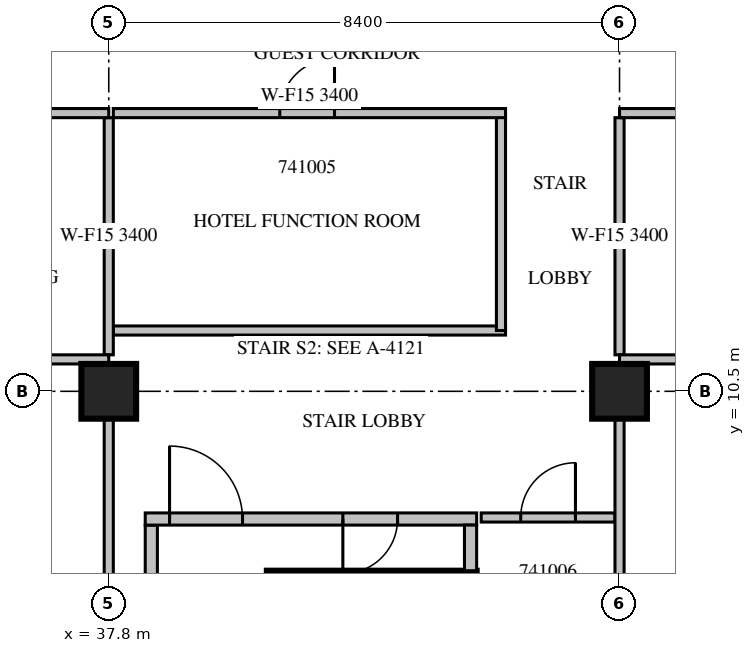
"""IFC4 building model, lengths in metres.
Left out: names, types, materials, properties, quantities, classifications, styles, units other than length and angle.
Written with IfcOpenShell. Run it as: python <this file> out.ifc"""

import sys

from ifc_helpers import new_model, si_unit, direction, frame, frame_2d, origin, origin_2d, place, context, subcontext, project, spatial, rectangle, extrude, source, transform, mapped, element, fill, save


model = new_model("IFC4")
c1 = context("Model", 3, precision=1e-05, world=origin(), true_north=direction((0.0, 1.0)))
c2 = subcontext(c1, "Body", "Model", "MODEL_VIEW")
j1 = project(units=[si_unit("LENGTHUNIT", "METRE"), si_unit("PLANEANGLEUNIT", "RADIAN")], contexts=[c1])
p1 = place(None, origin())
s1 = spatial("IfcSite", under=j1, at=p1, CompositionType="ELEMENT")
p2 = place(p1, origin())
s2 = spatial("IfcBuilding", under=s1, at=p2, CompositionType="ELEMENT")
p3 = place(p2, frame((0.0, 0.0, 189.2)))
s3 = spatial("IfcBuildingStorey", under=s2, at=p3, CompositionType="ELEMENT", Elevation=189.2)
m1 = source(origin(), c2, "Body", "SweptSolid", [
    extrude(rectangle(XDim=0.9, YDim=0.9, at=origin_2d()), origin(), (0.0, 0.0, 1.0), 3.8),
])
for number, where, z_axis, x_axis in (
    (1, (37.8, 10.5, 0.0), (0.0, 0.0, 1.0), (1.0, 0.0, 0.0)),
    (2, (46.2, 10.5, 0.0), (0.0, 0.0, 1.0), (1.0, 0.0, 0.0)),
):
    element("IfcColumn", number, at=place(p3, frame(where, z_axis=z_axis, x_axis=x_axis)), inside=s3, PredefinedType="COLUMN", context=c2, shape_type="MappedRepresentation", body=[
        mapped(m1, transform((0.0, 0.0, 0.0), scale=1.0)),
    ])
m2 = source(origin(), c2, "Body", "SweptSolid", [
    extrude(rectangle(XDim=3.45, YDim=0.25, at=frame_2d((1.725, 0.0))), origin(), (0.0, 0.0, 1.0), 3.4),
])
p4 = place(p3, frame((40.4, 7.425, 0.0), z_axis=(0.0, 0.0, 1.0), x_axis=(1.0, 0.0, 0.0)))
e3 = element("IfcWall", 3, at=p4, inside=s3, PredefinedType="SOLIDWALL", context=c2, shape_type="MappedRepresentation", body=[
    mapped(m2, transform((0.0, 0.0, 0.0), scale=1.0)),
])
m3 = source(origin(), c2, "Body", "SweptSolid", [
    extrude(rectangle(XDim=8.0, YDim=0.2, at=frame_2d((4.0, 0.0))), origin(), (0.0, 0.0, 1.0), 3.4),
])
p5 = place(p3, frame((38.5, 0.3, 0.0), z_axis=(0.0, 0.0, 1.0), x_axis=(0.0, 1.0, 0.0)))
e4 = element("IfcWall", 4, at=p5, inside=s3, PredefinedType="PARTITIONING", context=c2, shape_type="MappedRepresentation", body=[
    mapped(m3, transform((0.0, 0.0, 0.0), scale=1.0)),
])
m4 = source(origin(), c2, "Body", "SweptSolid", [
    extrude(rectangle(XDim=5.45, YDim=0.2, at=frame_2d((2.725, 0.0))), origin(), (0.0, 0.0, 1.0), 3.4),
])
p6 = place(p3, frame((38.4, 8.4, 0.0), z_axis=(0.0, 0.0, 1.0), x_axis=(1.0, 0.0, 0.0)))
e5 = element("IfcWall", 5, at=p6, inside=s3, PredefinedType="PARTITIONING", context=c2, shape_type="MappedRepresentation", body=[
    mapped(m4, transform((0.0, 0.0, 0.0), scale=1.0)),
])
m5 = source(origin(), c2, "Body", "SweptSolid", [
    extrude(rectangle(XDim=1.2, YDim=2.1, at=frame_2d((0.6, 1.05))), frame((0.0, 0.11, 0.0), z_axis=(0.0, -1.0, 0.0), x_axis=(1.0, 0.0, 0.0)), (0.0, 0.0, 1.0), 0.22),
])
p7 = place(p6, frame((0.4, 0.0, 0.0)))
e6 = element("IfcOpeningElement", 6, at=p7, cuts=e5, PredefinedType="OPENING", context=c2, shape_type="MappedRepresentation", body=[
    mapped(m5, transform((0.0, 0.0, 0.0), scale=1.0)),
])
m6 = source(origin(), c2, "Body", "SweptSolid", [
    extrude(rectangle(XDim=0.9, YDim=2.1, at=frame_2d((0.45, 1.05))), frame((0.0, 0.11, 0.0), z_axis=(0.0, -1.0, 0.0), x_axis=(1.0, 0.0, 0.0)), (0.0, 0.0, 1.0), 0.22),
])
p8 = place(p6, frame((3.25, 0.0, 0.0)))
e7 = element("IfcOpeningElement", 7, at=p8, cuts=e5, PredefinedType="OPENING", context=c2, shape_type="MappedRepresentation", body=[
    mapped(m6, transform((0.0, 0.0, 0.0), scale=1.0)),
])
m7 = source(origin(), c2, "Body", "SweptSolid", [
    extrude(rectangle(XDim=0.75, YDim=0.2, at=frame_2d((0.375, 0.0))), origin(), (0.0, 0.0, 1.0), 3.4),
])
p9 = place(p3, frame((43.75, 7.55, 0.0), z_axis=(0.0, 0.0, 1.0), x_axis=(0.0, 1.0, 0.0)))
e8 = element("IfcWall", 8, at=p9, inside=s3, PredefinedType="PARTITIONING", context=c2, shape_type="MappedRepresentation", body=[
    mapped(m7, transform((0.0, 0.0, 0.0), scale=1.0)),
])
m8 = source(origin(), c2, "Body", "SweptSolid", [
    extrude(rectangle(XDim=6.45, YDim=0.15, at=frame_2d((3.225, 0.0))), origin(), (0.0, 0.0, 1.0), 3.4),
])
p10 = place(p3, frame((37.875, 11.5, 0.0), z_axis=(0.0, 0.0, 1.0), x_axis=(1.0, 0.0, 0.0)))
e9 = element("IfcWall", 9, at=p10, inside=s3, PredefinedType="PARTITIONING", context=c2, shape_type="MappedRepresentation", body=[
    mapped(m8, transform((0.0, 0.0, 0.0), scale=1.0)),
])
m9 = source(origin(), c2, "Body", "SweptSolid", [
    extrude(rectangle(XDim=3.575, YDim=0.15, at=frame_2d((1.788, 0.0))), origin(), (0.0, 0.0, 1.0), 3.4),
])
p11 = place(p3, frame((44.25, 11.5, 0.0), z_axis=(0.0, 0.0, 1.0), x_axis=(0.0, 1.0, 0.0)))
e10 = element("IfcWall", 10, at=p11, inside=s3, PredefinedType="PARTITIONING", context=c2, shape_type="MappedRepresentation", body=[
    mapped(m9, transform((0.0, 0.0, 0.0), scale=1.0)),
])
p12 = place(p3, frame((44.325, 15.075, 0.0), z_axis=(0.0, 0.0, 1.0), x_axis=(-1.0, 0.0, 0.0)))
e11 = element("IfcWall", 11, at=p12, inside=s3, PredefinedType="PARTITIONING", context=c2, shape_type="MappedRepresentation", body=[
    mapped(m8, transform((0.0, 0.0, 0.0), scale=1.0)),
])
m10 = source(origin(), c2, "Body", "SweptSolid", [
    extrude(rectangle(XDim=0.9, YDim=2.1, at=frame_2d((0.45, 1.05))), frame((0.0, 0.085, 0.0), z_axis=(0.0, -1.0, 0.0), x_axis=(1.0, 0.0, 0.0)), (0.0, 0.0, 1.0), 0.17),
])
p13 = place(p12, frame((2.812, 0.0, 0.0)))
e12 = element("IfcOpeningElement", 12, at=p13, cuts=e11, PredefinedType="OPENING", context=c2, shape_type="MappedRepresentation", body=[
    mapped(m10, transform((0.0, 0.0, 0.0), scale=1.0)),
])
m11 = source(origin(), c2, "Body", "SweptSolid", [
    extrude(rectangle(XDim=2.2, YDim=0.15, at=frame_2d((1.1, 0.0))), origin(), (0.0, 0.0, 1.0), 3.4),
])
p14 = place(p3, frame((46.125, 8.425, 0.0), z_axis=(0.0, 0.0, 1.0), x_axis=(-1.0, 0.0, 0.0)))
e13 = element("IfcWall", 13, at=p14, inside=s3, PredefinedType="PARTITIONING", context=c2, shape_type="MappedRepresentation", body=[
    mapped(m11, transform((0.0, 0.0, 0.0), scale=1.0)),
])
p15 = place(p14, frame((0.65, 0.0, 0.0)))
e14 = element("IfcOpeningElement", 14, at=p15, cuts=e13, PredefinedType="OPENING", context=c2, shape_type="MappedRepresentation", body=[
    mapped(m10, transform((0.0, 0.0, 0.0), scale=1.0)),
])
m12 = source(origin(), c2, "Body", "SweptSolid", [
    extrude(rectangle(XDim=9.152, YDim=0.15, at=frame_2d((4.576, 0.0))), origin(), (0.0, 0.0, 1.0), 3.4),
])
p16 = place(p3, frame((37.8, 0.899, 0.0), z_axis=(0.0, 0.0, 1.0), x_axis=(0.0, 1.0, 0.0)))
e15 = element("IfcWall", 15, at=p16, inside=s3, PredefinedType="PARTITIONING", context=c2, shape_type="MappedRepresentation", body=[
    mapped(m12, transform((0.0, 0.0, 0.0), scale=1.0)),
])
m13 = source(origin(), c2, "Body", "SweptSolid", [
    extrude(rectangle(XDim=3.9, YDim=0.15, at=frame_2d((1.95, 0.0))), origin(), (0.0, 0.0, 1.0), 3.4),
])
p17 = place(p3, frame((37.8, 11.1, 0.0), z_axis=(0.0, 0.0, 1.0), x_axis=(0.0, 1.0, 0.0)))
e16 = element("IfcWall", 16, at=p17, inside=s3, PredefinedType="PARTITIONING", context=c2, shape_type="MappedRepresentation", body=[
    mapped(m13, transform((0.0, 0.0, 0.0), scale=1.0)),
])
m14 = source(origin(), c2, "Body", "SweptSolid", [
    extrude(rectangle(XDim=8.4, YDim=0.15, at=frame_2d((4.2, 0.0))), origin(), (0.0, 0.0, 1.0), 2.9),
])
p18 = place(p3, frame((37.8, 11.025, 0.0), z_axis=(0.0, 0.0, 1.0), x_axis=(-1.0, 0.0, 0.0)))
e17 = element("IfcWall", 17, at=p18, inside=s3, PredefinedType="PARTITIONING", context=c2, shape_type="MappedRepresentation", body=[
    mapped(m14, transform((0.0, 0.0, 0.0), scale=1.0)),
])
m15 = source(origin(), c2, "Body", "SweptSolid", [
    extrude(rectangle(XDim=1.1, YDim=2.1, at=frame_2d((0.55, 1.05))), frame((0.0, 0.085, 0.0), z_axis=(0.0, -1.0, 0.0), x_axis=(1.0, 0.0, 0.0)), (0.0, 0.0, 1.0), 0.17),
])
p19 = place(p18, frame((6.424, 0.0, 0.0)))
e18 = element("IfcOpeningElement", 18, at=p19, cuts=e17, PredefinedType="OPENING", context=c2, shape_type="MappedRepresentation", body=[
    mapped(m15, transform((0.0, 0.0, 0.0), scale=1.0)),
])
p20 = place(p18, frame((4.12, 0.0, 0.0)))
e19 = element("IfcOpeningElement", 19, at=p20, cuts=e17, PredefinedType="OPENING", context=c2, shape_type="MappedRepresentation", body=[
    mapped(m10, transform((0.0, 0.0, 0.0), scale=1.0)),
])
p21 = place(p18, frame((1.346, 0.0, 0.0)))
e20 = element("IfcOpeningElement", 20, at=p21, cuts=e17, PredefinedType="OPENING", context=c2, shape_type="MappedRepresentation", body=[
    mapped(m10, transform((0.0, 0.0, 0.0), scale=1.0)),
])
p22 = place(p3, frame((46.2, 0.899, 0.0), z_axis=(0.0, 0.0, 1.0), x_axis=(0.0, 1.0, 0.0)))
e21 = element("IfcWall", 21, at=p22, inside=s3, PredefinedType="PARTITIONING", context=c2, shape_type="MappedRepresentation", body=[
    mapped(m12, transform((0.0, 0.0, 0.0), scale=1.0)),
])
p23 = place(p3, frame((46.2, 11.1, 0.0), z_axis=(0.0, 0.0, 1.0), x_axis=(0.0, 1.0, 0.0)))
e22 = element("IfcWall", 22, at=p23, inside=s3, PredefinedType="PARTITIONING", context=c2, shape_type="MappedRepresentation", body=[
    mapped(m13, transform((0.0, 0.0, 0.0), scale=1.0)),
])
m16 = source(origin(), c2, "Body", "SweptSolid", [
    extrude(rectangle(XDim=13.14, YDim=0.15, at=frame_2d((6.57, 0.0))), origin(), (0.0, 0.0, 1.0), 3.4),
])
p24 = place(p3, frame((59.34, 11.025, 0.0), z_axis=(0.0, 0.0, 1.0), x_axis=(-1.0, 0.0, 0.0)))
e23 = element("IfcWall", 23, at=p24, inside=s3, PredefinedType="PARTITIONING", context=c2, shape_type="MappedRepresentation", body=[
    mapped(m16, transform((0.0, 0.0, 0.0), scale=1.0)),
])
m17 = source(origin(), c2, "Body", "SweptSolid", [
    extrude(rectangle(XDim=1.0, YDim=2.1, at=frame_2d((0.5, 1.05))), frame((0.0, 0.085, 0.0), z_axis=(0.0, -1.0, 0.0), x_axis=(1.0, 0.0, 0.0)), (0.0, 0.0, 1.0), 0.17),
])
p25 = place(p24, frame((9.703, 0.0, 0.0)))
e24 = element("IfcOpeningElement", 24, at=p25, cuts=e23, PredefinedType="OPENING", context=c2, shape_type="MappedRepresentation", body=[
    mapped(m17, transform((0.0, 0.0, 0.0), scale=1.0)),
])
p26 = place(p24, frame((8.602, 0.0, 0.0)))
e25 = element("IfcOpeningElement", 25, at=p26, cuts=e23, PredefinedType="OPENING", context=c2, shape_type="MappedRepresentation", body=[
    mapped(m17, transform((0.0, 0.0, 0.0), scale=1.0)),
])
p27 = place(p24, frame((5.061, 0.0, 0.0)))
e26 = element("IfcOpeningElement", 26, at=p27, cuts=e23, PredefinedType="OPENING", context=c2, shape_type="MappedRepresentation", body=[
    mapped(m10, transform((0.0, 0.0, 0.0), scale=1.0)),
])
p28 = place(p24, frame((2.546, 0.0, 0.0)))
e27 = element("IfcOpeningElement", 27, at=p28, cuts=e23, PredefinedType="OPENING", context=c2, shape_type="MappedRepresentation", body=[
    mapped(m10, transform((0.0, 0.0, 0.0), scale=1.0)),
])
p29 = place(p3, frame((37.8, 15.075, 0.0), z_axis=(0.0, 0.0, 1.0), x_axis=(-1.0, 0.0, 0.0)))
e28 = element("IfcWall", 28, at=p29, inside=s3, PredefinedType="PARTITIONING", context=c2, shape_type="MappedRepresentation", body=[
    mapped(m14, transform((0.0, 0.0, 0.0), scale=1.0)),
])
p30 = place(p29, frame((6.662, 0.0, 0.0)))
e29 = element("IfcOpeningElement", 29, at=p30, cuts=e28, PredefinedType="OPENING", context=c2, shape_type="MappedRepresentation", body=[
    mapped(m15, transform((0.0, 0.0, 0.0), scale=1.0)),
])
p31 = place(p3, frame((59.34, 15.075, 0.0), z_axis=(0.0, 0.0, 1.0), x_axis=(-1.0, 0.0, 0.0)))
e30 = element("IfcWall", 30, at=p31, inside=s3, PredefinedType="PARTITIONING", context=c2, shape_type="MappedRepresentation", body=[
    mapped(m16, transform((0.0, 0.0, 0.0), scale=1.0)),
])
m18 = source(origin(), c2, "Body", "SweptSolid", [
    extrude(rectangle(XDim=1.2, YDim=2.1, at=frame_2d((0.6, 1.05))), frame((0.0, 0.085, 0.0), z_axis=(0.0, -1.0, 0.0), x_axis=(1.0, 0.0, 0.0)), (0.0, 0.0, 1.0), 0.17),
])
p32 = place(p31, frame((9.6, 0.0, 0.0)))
e31 = element("IfcOpeningElement", 31, at=p32, cuts=e30, PredefinedType="OPENING", context=c2, shape_type="MappedRepresentation", body=[
    mapped(m18, transform((0.0, 0.0, 0.0), scale=1.0)),
])
m19 = source(origin(), c2, "Body", "SweptSolid", [
    extrude(rectangle(XDim=1.2, YDim=2.1, at=frame_2d((0.6, 1.05))), frame((0.0, 0.025, 0.0), z_axis=(0.0, -1.0, 0.0), x_axis=(1.0, 0.0, 0.0)), (0.0, 0.0, 1.0), 0.05),
])
p33 = place(p7, origin())
e32 = element("IfcDoor", 32, at=p33, inside=s3, OperationType="SINGLE_SWING_LEFT", PredefinedType="DOOR", context=c2, shape_type="MappedRepresentation", body=[
    mapped(m19, transform((0.0, 0.0, 0.0), scale=1.0)),
])
fill(e6, e32)
m20 = source(origin(), c2, "Body", "SweptSolid", [
    extrude(rectangle(XDim=0.9, YDim=2.1, at=frame_2d((0.45, 1.05))), frame((0.0, 0.025, 0.0), z_axis=(0.0, -1.0, 0.0), x_axis=(1.0, 0.0, 0.0)), (0.0, 0.0, 1.0), 0.05),
])
p34 = place(p8, origin())
e33 = element("IfcDoor", 33, at=p34, inside=s3, OperationType="SINGLE_SWING_RIGHT", PredefinedType="DOOR", context=c2, shape_type="MappedRepresentation", body=[
    mapped(m20, transform((0.0, 0.0, 0.0), scale=1.0)),
])
fill(e7, e33)
p35 = place(p13, origin())
e34 = element("IfcDoor", 34, at=p35, inside=s3, OperationType="SINGLE_SWING_RIGHT", PredefinedType="DOOR", context=c2, shape_type="MappedRepresentation", body=[
    mapped(m20, transform((0.0, 0.0, 0.0), scale=1.0)),
])
fill(e12, e34)
p36 = place(p15, origin())
e35 = element("IfcDoor", 35, at=p36, inside=s3, OperationType="SINGLE_SWING_RIGHT", PredefinedType="DOOR", context=c2, shape_type="MappedRepresentation", body=[
    mapped(m20, transform((0.0, 0.0, 0.0), scale=1.0)),
])
fill(e14, e35)
save(model, sys.argv[1])
